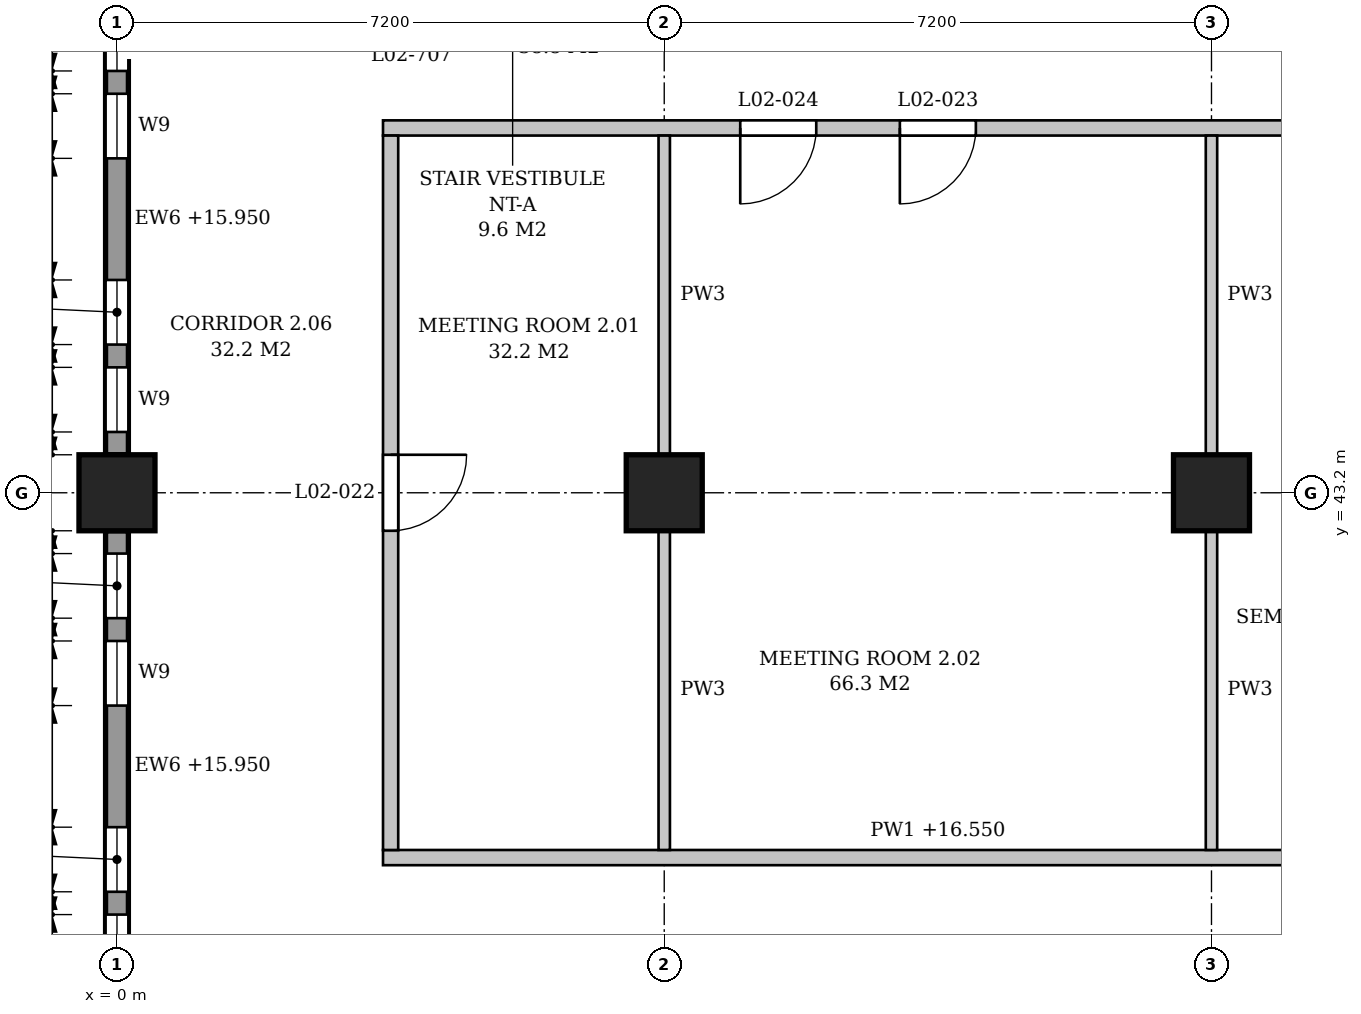
"""IFC4 building model, lengths in metres.
Left out: names, types, materials, properties, quantities, classifications, styles, units other than length and angle.
Written with IfcOpenShell. Run it as: python <this file> out.ifc"""

import sys

from ifc_helpers import new_model, si_unit, direction, frame, frame_2d, origin, origin_2d, place, context, subcontext, project, spatial, polyline, rectangle, outline, extrude, element, fill, save


model = new_model("IFC4")
c1 = context("Model", 3, precision=1e-05, world=origin(), true_north=direction((0.0, 1.0)))
c2 = subcontext(c1, "Body", "Model", "MODEL_VIEW")
j1 = project(units=[si_unit("LENGTHUNIT", "METRE"), si_unit("PLANEANGLEUNIT", "RADIAN")], contexts=[c1])
p1 = place(None, origin())
s1 = spatial("IfcSite", under=j1, at=p1, CompositionType="ELEMENT")
p2 = place(p1, origin())
s2 = spatial("IfcBuilding", under=s1, at=p2, CompositionType="ELEMENT")
p3 = place(p2, frame((0.0, 0.0, 11.4)))
s3 = spatial("IfcBuildingStorey", under=s2, at=p3, CompositionType="ELEMENT", Elevation=11.4)
for number, where, z_axis, x_axis in (
    (1, (0.0, 43.2, 0.0), (0.0, 0.0, 1.0), (1.0, 0.0, 0.0)),
    (2, (7.2, 43.2, 0.0), (0.0, 0.0, 1.0), (1.0, 0.0, 0.0)),
    (3, (14.4, 43.2, 0.0), (0.0, 0.0, 1.0), (1.0, 0.0, 0.0)),
):
    element("IfcColumn", number, at=place(p3, frame(where, z_axis=z_axis, x_axis=x_axis)), inside=s3, PredefinedType="COLUMN", context=c2, shape_type="SweptSolid", body=[
        extrude(rectangle(XDim=1.0, YDim=1.0, at=origin_2d()), origin(), (0.0, 0.0, 1.0), 5.4),
    ])
p4 = place(p3, frame((0.0, 36.5, 0.0), z_axis=(0.0, 0.0, 1.0), x_axis=(0.0, 1.0, 0.0)))
e4 = element("IfcWall", 4, at=p4, inside=s3, PredefinedType="STANDARD", context=c2, shape_type="SweptSolid", body=[
    extrude(rectangle(XDim=6.2, YDim=0.3, at=frame_2d((3.1, 0.0))), origin(), (0.0, 0.0, 1.0), 4.55),
])
p5 = place(p4, frame((0.3, 0.0, 0.9)))
e5 = element("IfcOpeningElement", 5, at=p5, cuts=e4, PredefinedType="OPENING", context=c2, shape_type="SweptSolid", body=[
    extrude(outline(polyline([(0.0, 0.0), (0.85, 0.0), (0.85, 2.65), (0.425, 3.1), (0.0, 2.65), (0.0, 0.0)])), frame((0.0, 0.16, 0.0), z_axis=(0.0, -1.0, 0.0), x_axis=(1.0, 0.0, 0.0)), (0.0, 0.0, 1.0), 0.32),
])
p6 = place(p4, frame((1.45, 0.0, 0.9)))
e6 = element("IfcOpeningElement", 6, at=p6, cuts=e4, PredefinedType="OPENING", context=c2, shape_type="SweptSolid", body=[
    extrude(outline(polyline([(0.0, 0.0), (0.85, 0.0), (0.85, 2.65), (0.425, 3.1), (0.0, 2.65), (0.0, 0.0)])), frame((0.0, 0.16, 0.0), z_axis=(0.0, -1.0, 0.0), x_axis=(1.0, 0.0, 0.0)), (0.0, 0.0, 1.0), 0.32),
])
p7 = place(p4, frame((3.9, 0.0, 0.9)))
e7 = element("IfcOpeningElement", 7, at=p7, cuts=e4, PredefinedType="OPENING", context=c2, shape_type="SweptSolid", body=[
    extrude(outline(polyline([(0.0, 0.0), (0.85, 0.0), (0.85, 2.65), (0.425, 3.1), (0.0, 2.65), (0.0, 0.0)])), frame((0.0, 0.16, 0.0), z_axis=(0.0, -1.0, 0.0), x_axis=(1.0, 0.0, 0.0)), (0.0, 0.0, 1.0), 0.32),
])
p8 = place(p4, frame((5.05, 0.0, 0.9)))
e8 = element("IfcOpeningElement", 8, at=p8, cuts=e4, PredefinedType="OPENING", context=c2, shape_type="SweptSolid", body=[
    extrude(outline(polyline([(0.0, 0.0), (0.85, 0.0), (0.85, 2.65), (0.425, 3.1), (0.0, 2.65), (0.0, 0.0)])), frame((0.0, 0.16, 0.0), z_axis=(0.0, -1.0, 0.0), x_axis=(1.0, 0.0, 0.0)), (0.0, 0.0, 1.0), 0.32),
])
p9 = place(p3, frame((0.0, 43.7, 0.0), z_axis=(0.0, 0.0, 1.0), x_axis=(0.0, 1.0, 0.0)))
e9 = element("IfcWall", 9, at=p9, inside=s3, PredefinedType="STANDARD", context=c2, shape_type="SweptSolid", body=[
    extrude(rectangle(XDim=6.2, YDim=0.3, at=frame_2d((3.1, 0.0))), origin(), (0.0, 0.0, 1.0), 4.55),
])
p10 = place(p9, frame((0.3, 0.0, 0.9)))
e10 = element("IfcOpeningElement", 10, at=p10, cuts=e9, PredefinedType="OPENING", context=c2, shape_type="SweptSolid", body=[
    extrude(outline(polyline([(0.0, 0.0), (0.85, 0.0), (0.85, 2.65), (0.425, 3.1), (0.0, 2.65), (0.0, 0.0)])), frame((0.0, 0.16, 0.0), z_axis=(0.0, -1.0, 0.0), x_axis=(1.0, 0.0, 0.0)), (0.0, 0.0, 1.0), 0.32),
])
p11 = place(p9, frame((1.45, 0.0, 0.9)))
e11 = element("IfcOpeningElement", 11, at=p11, cuts=e9, PredefinedType="OPENING", context=c2, shape_type="SweptSolid", body=[
    extrude(outline(polyline([(0.0, 0.0), (0.85, 0.0), (0.85, 2.65), (0.425, 3.1), (0.0, 2.65), (0.0, 0.0)])), frame((0.0, 0.16, 0.0), z_axis=(0.0, -1.0, 0.0), x_axis=(1.0, 0.0, 0.0)), (0.0, 0.0, 1.0), 0.32),
])
p12 = place(p9, frame((3.9, 0.0, 0.9)))
e12 = element("IfcOpeningElement", 12, at=p12, cuts=e9, PredefinedType="OPENING", context=c2, shape_type="SweptSolid", body=[
    extrude(outline(polyline([(0.0, 0.0), (0.85, 0.0), (0.85, 2.65), (0.425, 3.1), (0.0, 2.65), (0.0, 0.0)])), frame((0.0, 0.16, 0.0), z_axis=(0.0, -1.0, 0.0), x_axis=(1.0, 0.0, 0.0)), (0.0, 0.0, 1.0), 0.32),
])
p13 = place(p9, frame((5.05, 0.0, 0.9)))
e13 = element("IfcOpeningElement", 13, at=p13, cuts=e9, PredefinedType="OPENING", context=c2, shape_type="SweptSolid", body=[
    extrude(outline(polyline([(0.0, 0.0), (0.85, 0.0), (0.85, 2.65), (0.425, 3.1), (0.0, 2.65), (0.0, 0.0)])), frame((0.0, 0.16, 0.0), z_axis=(0.0, -1.0, 0.0), x_axis=(1.0, 0.0, 0.0)), (0.0, 0.0, 1.0), 0.32),
])
p14 = place(p3, frame((3.5, 38.4, 0.0), z_axis=(0.0, 0.0, 1.0), x_axis=(1.0, 0.0, 0.0)))
e14 = element("IfcWall", 14, at=p14, inside=s3, PredefinedType="PARTITIONING", context=c2, shape_type="SweptSolid", body=[
    extrude(outline(polyline([(0.0, 0.0), (14.6, 0.0), (14.6, 5.15), (11.15, 5.15), (11.15, 4.4), (10.65, 4.4), (10.65, 5.15), (3.95, 5.15), (3.95, 4.4), (3.45, 4.4), (3.45, 5.15), (0.0, 5.15), (0.0, 0.0)])), frame((0.0, 0.1, 0.0), z_axis=(0.0, -1.0, 0.0), x_axis=(1.0, 0.0, 0.0)), (0.0, 0.0, 1.0), 0.2),
])
p15 = place(p3, frame((3.5, 48.0, 0.0), z_axis=(0.0, 0.0, 1.0), x_axis=(1.0, 0.0, 0.0)))
e15 = element("IfcWall", 15, at=p15, inside=s3, PredefinedType="PARTITIONING", context=c2, shape_type="SweptSolid", body=[
    extrude(outline(polyline([(0.0, 0.0), (14.6, 0.0), (14.6, 5.15), (11.15, 5.15), (11.15, 4.4), (10.65, 4.4), (10.65, 5.15), (3.95, 5.15), (3.95, 4.4), (3.45, 4.4), (3.45, 5.15), (0.0, 5.15), (0.0, 0.0)])), frame((0.0, 0.1, 0.0), z_axis=(0.0, -1.0, 0.0), x_axis=(1.0, 0.0, 0.0)), (0.0, 0.0, 1.0), 0.2),
])
p16 = place(p15, frame((6.8, 0.0, 0.0)))
e16 = element("IfcOpeningElement", 16, at=p16, cuts=e15, PredefinedType="OPENING", context=c2, shape_type="SweptSolid", body=[
    extrude(rectangle(XDim=1.0, YDim=2.1, at=frame_2d((0.5, 1.05))), frame((0.0, 0.11, 0.0), z_axis=(0.0, -1.0, 0.0), x_axis=(1.0, 0.0, 0.0)), (0.0, 0.0, 1.0), 0.22),
])
p17 = place(p15, frame((4.7, 0.0, 0.0)))
e17 = element("IfcOpeningElement", 17, at=p17, cuts=e15, PredefinedType="OPENING", context=c2, shape_type="SweptSolid", body=[
    extrude(rectangle(XDim=1.0, YDim=2.1, at=frame_2d((0.5, 1.05))), frame((0.0, 0.11, 0.0), z_axis=(0.0, -1.0, 0.0), x_axis=(1.0, 0.0, 0.0)), (0.0, 0.0, 1.0), 0.22),
])
p18 = place(p3, frame((3.6, 38.5, 0.0), z_axis=(0.0, 0.0, 1.0), x_axis=(0.0, 1.0, 0.0)))
e18 = element("IfcWall", 18, at=p18, inside=s3, PredefinedType="PARTITIONING", context=c2, shape_type="SweptSolid", body=[
    extrude(outline(polyline([(0.0, 0.0), (9.4, 0.0), (9.4, 5.15), (4.95, 5.15), (4.95, 4.4), (4.45, 4.4), (4.45, 5.15), (0.0, 5.15), (0.0, 0.0)])), frame((0.0, 0.1, 0.0), z_axis=(0.0, -1.0, 0.0), x_axis=(1.0, 0.0, 0.0)), (0.0, 0.0, 1.0), 0.2),
])
p19 = place(p18, frame((4.2, 0.0, 0.0)))
e19 = element("IfcOpeningElement", 19, at=p19, cuts=e18, PredefinedType="OPENING", context=c2, shape_type="SweptSolid", body=[
    extrude(rectangle(XDim=1.0, YDim=2.1, at=frame_2d((0.5, 1.05))), frame((0.0, 0.11, 0.0), z_axis=(0.0, -1.0, 0.0), x_axis=(1.0, 0.0, 0.0)), (0.0, 0.0, 1.0), 0.22),
])
for number, where, z_axis, x_axis in (
    (20, (7.2, 38.5, 0.0), (0.0, 0.0, 1.0), (0.0, 1.0, 0.0)),
    (21, (7.2, 43.7, 0.0), (0.0, 0.0, 1.0), (0.0, 1.0, 0.0)),
    (22, (14.4, 38.5, 0.0), (0.0, 0.0, 1.0), (0.0, 1.0, 0.0)),
    (23, (14.4, 43.7, 0.0), (0.0, 0.0, 1.0), (0.0, 1.0, 0.0)),
):
    element("IfcWall", number, at=place(p3, frame(where, z_axis=z_axis, x_axis=x_axis)), inside=s3, PredefinedType="PARTITIONING", context=c2, shape_type="SweptSolid", body=[
        extrude(rectangle(XDim=4.2, YDim=0.15, at=frame_2d((2.1, 0.0))), origin(), (0.0, 0.0, 1.0), 4.4),
    ])
p20 = place(p5, origin())
e24 = element("IfcWindow", 24, at=p20, inside=s3, PartitioningType="SINGLE_PANEL", PredefinedType="WINDOW", context=c2, shape_type="SweptSolid", body=[
    extrude(outline(polyline([(0.0, 0.0), (0.85, 0.0), (0.85, 2.65), (0.425, 3.1), (0.0, 2.65), (0.0, 0.0)])), frame((0.0, 0.03, 0.0), z_axis=(0.0, -1.0, 0.0), x_axis=(1.0, 0.0, 0.0)), (0.0, 0.0, 1.0), 0.06),
])
fill(e5, e24)
p21 = place(p6, origin())
e25 = element("IfcWindow", 25, at=p21, inside=s3, PartitioningType="SINGLE_PANEL", PredefinedType="WINDOW", context=c2, shape_type="SweptSolid", body=[
    extrude(outline(polyline([(0.0, 0.0), (0.85, 0.0), (0.85, 2.65), (0.425, 3.1), (0.0, 2.65), (0.0, 0.0)])), frame((0.0, 0.03, 0.0), z_axis=(0.0, -1.0, 0.0), x_axis=(1.0, 0.0, 0.0)), (0.0, 0.0, 1.0), 0.06),
])
fill(e6, e25)
p22 = place(p7, origin())
e26 = element("IfcWindow", 26, at=p22, inside=s3, PartitioningType="SINGLE_PANEL", PredefinedType="WINDOW", context=c2, shape_type="SweptSolid", body=[
    extrude(outline(polyline([(0.0, 0.0), (0.85, 0.0), (0.85, 2.65), (0.425, 3.1), (0.0, 2.65), (0.0, 0.0)])), frame((0.0, 0.03, 0.0), z_axis=(0.0, -1.0, 0.0), x_axis=(1.0, 0.0, 0.0)), (0.0, 0.0, 1.0), 0.06),
])
fill(e7, e26)
p23 = place(p8, origin())
e27 = element("IfcWindow", 27, at=p23, inside=s3, PartitioningType="SINGLE_PANEL", PredefinedType="WINDOW", context=c2, shape_type="SweptSolid", body=[
    extrude(outline(polyline([(0.0, 0.0), (0.85, 0.0), (0.85, 2.65), (0.425, 3.1), (0.0, 2.65), (0.0, 0.0)])), frame((0.0, 0.03, 0.0), z_axis=(0.0, -1.0, 0.0), x_axis=(1.0, 0.0, 0.0)), (0.0, 0.0, 1.0), 0.06),
])
fill(e8, e27)
p24 = place(p10, origin())
e28 = element("IfcWindow", 28, at=p24, inside=s3, PartitioningType="SINGLE_PANEL", PredefinedType="WINDOW", context=c2, shape_type="SweptSolid", body=[
    extrude(outline(polyline([(0.0, 0.0), (0.85, 0.0), (0.85, 2.65), (0.425, 3.1), (0.0, 2.65), (0.0, 0.0)])), frame((0.0, 0.03, 0.0), z_axis=(0.0, -1.0, 0.0), x_axis=(1.0, 0.0, 0.0)), (0.0, 0.0, 1.0), 0.06),
])
fill(e10, e28)
p25 = place(p11, origin())
e29 = element("IfcWindow", 29, at=p25, inside=s3, PartitioningType="SINGLE_PANEL", PredefinedType="WINDOW", context=c2, shape_type="SweptSolid", body=[
    extrude(outline(polyline([(0.0, 0.0), (0.85, 0.0), (0.85, 2.65), (0.425, 3.1), (0.0, 2.65), (0.0, 0.0)])), frame((0.0, 0.03, 0.0), z_axis=(0.0, -1.0, 0.0), x_axis=(1.0, 0.0, 0.0)), (0.0, 0.0, 1.0), 0.06),
])
fill(e11, e29)
p26 = place(p12, origin())
e30 = element("IfcWindow", 30, at=p26, inside=s3, PartitioningType="SINGLE_PANEL", PredefinedType="WINDOW", context=c2, shape_type="SweptSolid", body=[
    extrude(outline(polyline([(0.0, 0.0), (0.85, 0.0), (0.85, 2.65), (0.425, 3.1), (0.0, 2.65), (0.0, 0.0)])), frame((0.0, 0.03, 0.0), z_axis=(0.0, -1.0, 0.0), x_axis=(1.0, 0.0, 0.0)), (0.0, 0.0, 1.0), 0.06),
])
fill(e12, e30)
p27 = place(p13, origin())
e31 = element("IfcWindow", 31, at=p27, inside=s3, PartitioningType="SINGLE_PANEL", PredefinedType="WINDOW", context=c2, shape_type="SweptSolid", body=[
    extrude(outline(polyline([(0.0, 0.0), (0.85, 0.0), (0.85, 2.65), (0.425, 3.1), (0.0, 2.65), (0.0, 0.0)])), frame((0.0, 0.03, 0.0), z_axis=(0.0, -1.0, 0.0), x_axis=(1.0, 0.0, 0.0)), (0.0, 0.0, 1.0), 0.06),
])
fill(e13, e31)
p28 = place(p19, frame((1.0, 0.0, 0.0), z_axis=(0.0, 0.0, 1.0), x_axis=(-1.0, 0.0, 0.0)))
e32 = element("IfcDoor", 32, at=p28, inside=s3, OperationType="SINGLE_SWING_LEFT", PredefinedType="DOOR", context=c2, shape_type="SweptSolid", body=[
    extrude(rectangle(XDim=1.0, YDim=2.1, at=frame_2d((0.5, 1.05))), frame((0.0, 0.025, 0.0), z_axis=(0.0, -1.0, 0.0), x_axis=(1.0, 0.0, 0.0)), (0.0, 0.0, 1.0), 0.05),
])
fill(e19, e32)
p29 = place(p16, frame((1.0, 0.0, 0.0), z_axis=(0.0, 0.0, 1.0), x_axis=(-1.0, 0.0, 0.0)))
e33 = element("IfcDoor", 33, at=p29, inside=s3, OperationType="SINGLE_SWING_RIGHT", PredefinedType="DOOR", context=c2, shape_type="SweptSolid", body=[
    extrude(rectangle(XDim=1.0, YDim=2.1, at=frame_2d((0.5, 1.05))), frame((0.0, 0.025, 0.0), z_axis=(0.0, -1.0, 0.0), x_axis=(1.0, 0.0, 0.0)), (0.0, 0.0, 1.0), 0.05),
])
fill(e16, e33)
p30 = place(p17, frame((1.0, 0.0, 0.0), z_axis=(0.0, 0.0, 1.0), x_axis=(-1.0, 0.0, 0.0)))
e34 = element("IfcDoor", 34, at=p30, inside=s3, OperationType="SINGLE_SWING_RIGHT", PredefinedType="DOOR", context=c2, shape_type="SweptSolid", body=[
    extrude(rectangle(XDim=1.0, YDim=2.1, at=frame_2d((0.5, 1.05))), frame((0.0, 0.025, 0.0), z_axis=(0.0, -1.0, 0.0), x_axis=(1.0, 0.0, 0.0)), (0.0, 0.0, 1.0), 0.05),
])
fill(e17, e34)
save(model, sys.argv[1])
